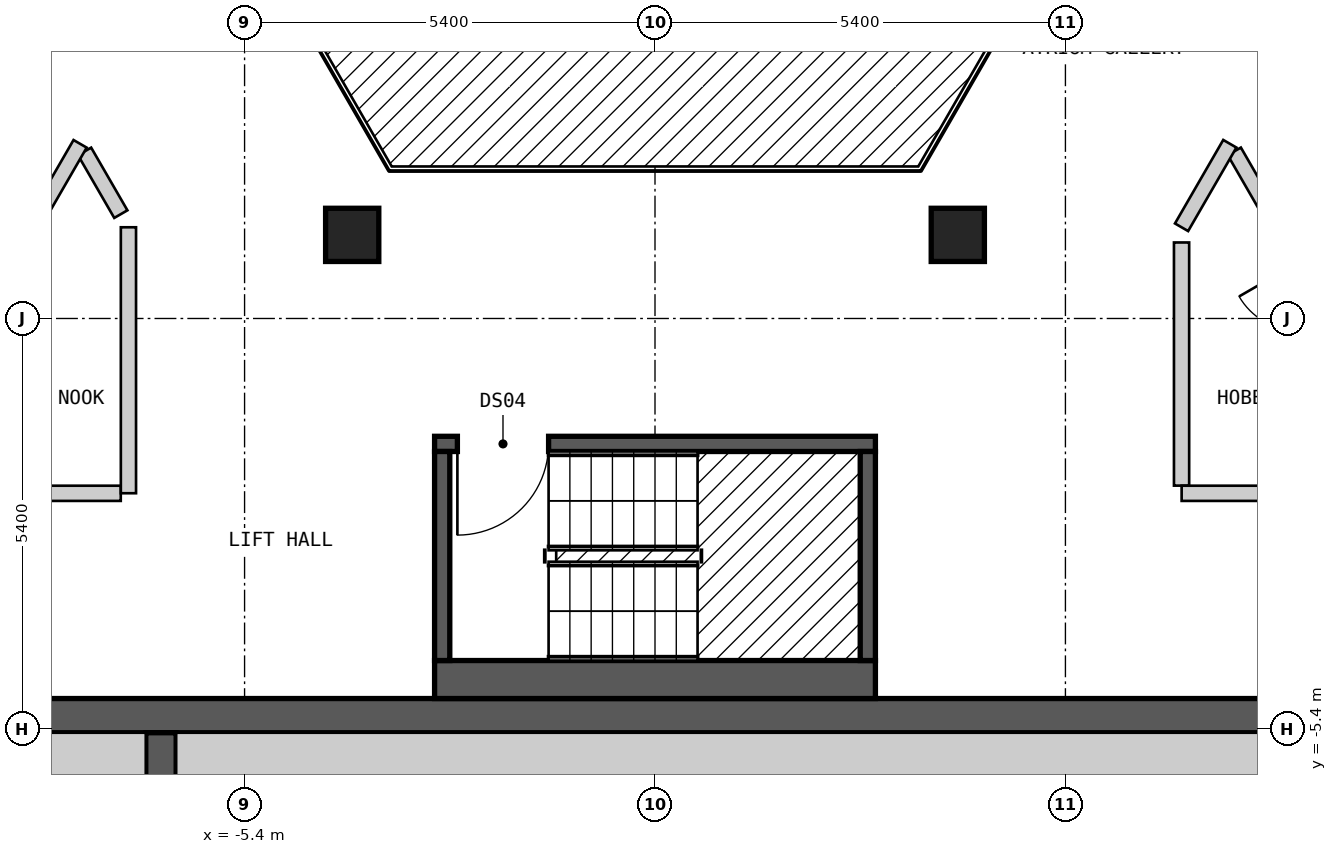
"""IFC4 building model, lengths in metres.
Left out: names, types, materials, properties, quantities, classifications, styles, units other than length and angle.
Written with IfcOpenShell. Run it as: python <this file> out.ifc"""

import sys

from ifc_helpers import new_model, si_unit, direction, frame, frame_2d, origin, origin_2d, place, context, subcontext, project, spatial, rectangle, extrude, element, fill, save


model = new_model("IFC4")
c1 = context("Model", 3, precision=1e-05, world=origin(), true_north=direction((0.0, 1.0)))
c2 = subcontext(c1, "Body", "Model", "MODEL_VIEW")
j1 = project(units=[si_unit("LENGTHUNIT", "METRE"), si_unit("PLANEANGLEUNIT", "RADIAN")], contexts=[c1])
p1 = place(None, origin())
s1 = spatial("IfcSite", under=j1, at=p1, CompositionType="ELEMENT")
p2 = place(p1, origin())
s2 = spatial("IfcBuilding", under=s1, at=p2, CompositionType="ELEMENT")
p3 = place(p2, frame((0.0, 0.0, 223.8)))
s3 = spatial("IfcBuildingStorey", under=s2, at=p3, CompositionType="ELEMENT", Elevation=223.8)
for number, where, z_axis, x_axis in (
    (1, (3.984, 1.1, 0.0), (0.0, 0.0, 1.0), (1.0, 0.0, 0.0)),
    (2, (-3.984, 1.1, 0.0), (0.0, 0.0, 1.0), (1.0, 0.0, 0.0)),
):
    element("IfcColumn", number, at=place(p3, frame(where, z_axis=z_axis, x_axis=x_axis)), inside=s3, PredefinedType="COLUMN", context=c2, shape_type="SweptSolid", body=[
        extrude(rectangle(XDim=0.7, YDim=0.7, at=origin_2d()), origin(), (0.0, 0.0, 1.0), 3.0),
    ])
p4 = place(p3, frame((-13.3, -5.225, 0.0), z_axis=(0.0, 0.0, 1.0), x_axis=(1.0, 0.0, 0.0)))
e3 = element("IfcWall", 3, at=p4, inside=s3, PredefinedType="SHEAR", context=c2, shape_type="SweptSolid", body=[
    extrude(rectangle(XDim=26.6, YDim=0.45, at=frame_2d((13.3, 0.0))), origin(), (0.0, 0.0, 1.0), 2.7),
])
p5 = place(p4, frame((23.65, 0.0, 0.0)))
e4 = element("IfcOpeningElement", 4, at=p5, cuts=e3, PredefinedType="OPENING", context=c2, shape_type="SweptSolid", body=[
    extrude(rectangle(XDim=1.2, YDim=2.1, at=frame_2d((0.6, 1.05))), frame((0.0, 0.235, 0.0), z_axis=(0.0, -1.0, 0.0), x_axis=(1.0, 0.0, 0.0)), (0.0, 0.0, 1.0), 0.47),
])
p6 = place(p3, frame((-6.5, -9.15, 0.0), z_axis=(0.0, 0.0, 1.0), x_axis=(0.0, 1.0, 0.0)))
e5 = element("IfcWall", 5, at=p6, inside=s3, PredefinedType="SHEAR", context=c2, shape_type="SweptSolid", body=[
    extrude(rectangle(XDim=3.7, YDim=0.4, at=frame_2d((1.85, 0.0))), origin(), (0.0, 0.0, 1.0), 2.7),
])
p7 = place(p3, frame((-2.9, -4.75, 0.0), z_axis=(0.0, 0.0, 1.0), x_axis=(1.0, 0.0, 0.0)))
e6 = element("IfcWall", 6, at=p7, inside=s3, PredefinedType="SOLIDWALL", context=c2, shape_type="SweptSolid", body=[
    extrude(rectangle(XDim=5.8, YDim=0.5, at=frame_2d((2.9, 0.0))), origin(), (0.0, 0.0, 1.0), 2.7),
])
p8 = place(p3, frame((-2.9, -1.65, 0.0), z_axis=(0.0, 0.0, 1.0), x_axis=(1.0, 0.0, 0.0)))
e7 = element("IfcWall", 7, at=p8, inside=s3, PredefinedType="SOLIDWALL", context=c2, shape_type="SweptSolid", body=[
    extrude(rectangle(XDim=5.8, YDim=0.2, at=frame_2d((2.9, 0.0))), origin(), (0.0, 0.0, 1.0), 2.7),
])
p9 = place(p8, frame((0.3, 0.0, 0.0)))
e8 = element("IfcOpeningElement", 8, at=p9, cuts=e7, PredefinedType="OPENING", context=c2, shape_type="SweptSolid", body=[
    extrude(rectangle(XDim=1.2, YDim=2.1, at=frame_2d((0.6, 1.05))), frame((0.0, 0.11, 0.0), z_axis=(0.0, -1.0, 0.0), x_axis=(1.0, 0.0, 0.0)), (0.0, 0.0, 1.0), 0.22),
])
for number, where, z_axis, x_axis in (
    (9, (-2.8, -4.5, 0.0), (0.0, 0.0, 1.0), (0.0, 1.0, 0.0)),
    (10, (2.8, -4.5, 0.0), (0.0, 0.0, 1.0), (0.0, 1.0, 0.0)),
):
    element("IfcWall", number, at=place(p3, frame(where, z_axis=z_axis, x_axis=x_axis)), inside=s3, PredefinedType="SOLIDWALL", context=c2, shape_type="SweptSolid", body=[
        extrude(rectangle(XDim=2.75, YDim=0.2, at=frame_2d((1.375, 0.0))), origin(), (0.0, 0.0, 1.0), 2.7),
    ])
p10 = place(p3, frame((-7.505, 2.198, 0.0), z_axis=(0.0, 0.0, 1.0), x_axis=(0.500409926597, -0.865788603161, 0.0)))
e11 = element("IfcWall", 11, at=p10, inside=s3, PredefinedType="PARTITIONING", context=c2, shape_type="SweptSolid", body=[
    extrude(rectangle(XDim=0.953, YDim=0.2, at=frame_2d((0.477, 0.0))), origin(), (0.0, 0.0, 1.0), 2.7),
])
p11 = place(p3, frame((7.622, 2.199, 0.0), z_axis=(0.0, 0.0, 1.0), x_axis=(0.499994660107, -0.866028486751, 0.0)))
e12 = element("IfcWall", 12, at=p11, inside=s3, PredefinedType="PARTITIONING", context=c2, shape_type="SweptSolid", body=[
    extrude(rectangle(XDim=4.27, YDim=0.2, at=frame_2d((2.135, 0.0))), origin(), (0.0, 0.0, 1.0), 2.7),
])
p12 = place(p11, frame((1.685, 0.0, 0.0)))
e13 = element("IfcOpeningElement", 13, at=p12, cuts=e12, PredefinedType="OPENING", context=c2, shape_type="SweptSolid", body=[
    extrude(rectangle(XDim=0.9, YDim=2.1, at=frame_2d((0.45, 1.05))), frame((0.0, 0.11, 0.0), z_axis=(0.0, -1.0, 0.0), x_axis=(1.0, 0.0, 0.0)), (0.0, 0.0, 1.0), 0.22),
])
p13 = place(p3, frame((6.928, 1.0, 0.0), z_axis=(0.0, 0.0, 1.0), x_axis=(0.0, -1.0, 0.0)))
e14 = element("IfcWall", 14, at=p13, inside=s3, PredefinedType="PARTITIONING", context=c2, shape_type="SweptSolid", body=[
    extrude(rectangle(XDim=3.199, YDim=0.2, at=frame_2d((1.6, 0.0))), origin(), (0.0, 0.0, 1.0), 2.7),
])
p14 = place(p3, frame((-9.41, -2.3, 0.0), z_axis=(0.0, 0.0, 1.0), x_axis=(1.0, 0.0, 0.0)))
e15 = element("IfcWall", 15, at=p14, inside=s3, PredefinedType="PARTITIONING", context=c2, shape_type="SweptSolid", body=[
    extrude(rectangle(XDim=2.381, YDim=0.2, at=frame_2d((1.19, 0.0))), origin(), (0.0, 0.0, 1.0), 2.7),
])
p15 = place(p3, frame((6.929, -2.3, 0.0), z_axis=(0.0, 0.0, 1.0), x_axis=(1.0, 0.0, 0.0)))
e16 = element("IfcWall", 16, at=p15, inside=s3, PredefinedType="PARTITIONING", context=c2, shape_type="SweptSolid", body=[
    extrude(rectangle(XDim=2.365, YDim=0.2, at=frame_2d((1.183, 0.0))), origin(), (0.0, 0.0, 1.0), 2.7),
])
p16 = place(p3, frame((6.928, 1.2, 0.0), z_axis=(0.0, 0.0, 1.0), x_axis=(0.500255167297, 0.865878032746, 0.0)))
e17 = element("IfcWall", 17, at=p16, inside=s3, PredefinedType="PARTITIONING", context=c2, shape_type="SweptSolid", body=[
    extrude(rectangle(XDim=1.269, YDim=0.2, at=frame_2d((0.635, 0.0))), origin(), (0.0, 0.0, 1.0), 2.7),
])
p17 = place(p3, frame((-9.815, -1.6, 0.0), z_axis=(0.0, 0.0, 1.0), x_axis=(0.500058909736, 0.865991389561, 0.0)))
e18 = element("IfcWall", 18, at=p17, inside=s3, PredefinedType="PARTITIONING", context=c2, shape_type="SweptSolid", body=[
    extrude(rectangle(XDim=4.501, YDim=0.2, at=frame_2d((2.251, 0.0))), origin(), (0.0, 0.0, 1.0), 2.7),
])
p18 = place(p17, frame((1.801, 0.0, 0.0)))
e19 = element("IfcOpeningElement", 19, at=p18, cuts=e18, PredefinedType="OPENING", context=c2, shape_type="SweptSolid", body=[
    extrude(rectangle(XDim=0.9, YDim=2.1, at=frame_2d((0.45, 1.05))), frame((0.0, 0.11, 0.0), z_axis=(0.0, -1.0, 0.0), x_axis=(1.0, 0.0, 0.0)), (0.0, 0.0, 1.0), 0.22),
])
p19 = place(p3, frame((-6.928, -2.299, 0.0), z_axis=(0.0, 0.0, 1.0), x_axis=(0.0, 1.0, 0.0)))
e20 = element("IfcWall", 20, at=p19, inside=s3, PredefinedType="PARTITIONING", context=c2, shape_type="SweptSolid", body=[
    extrude(rectangle(XDim=3.499, YDim=0.2, at=frame_2d((1.75, 0.0))), origin(), (0.0, 0.0, 1.0), 2.7),
])
p20 = place(p3, frame((-12.1, -5.825, 0.0), z_axis=(0.0, 0.0, 1.0), x_axis=(1.0, 0.0, 0.0)))
e21 = element("IfcWall", 21, at=p20, inside=s3, PredefinedType="SOLIDWALL", context=c2, shape_type="SweptSolid", body=[
    extrude(rectangle(XDim=5.4, YDim=0.75, at=frame_2d((2.7, 0.0))), origin(), (0.0, 0.0, 1.0), 2.7),
])
p21 = place(p3, frame((-6.3, -5.825, 0.0), z_axis=(0.0, 0.0, 1.0), x_axis=(1.0, 0.0, 0.0)))
e22 = element("IfcWall", 22, at=p21, inside=s3, PredefinedType="SOLIDWALL", context=c2, shape_type="SweptSolid", body=[
    extrude(rectangle(XDim=16.1, YDim=0.75, at=frame_2d((8.05, 0.0))), origin(), (0.0, 0.0, 1.0), 2.7),
])
p22 = place(p9, origin())
e23 = element("IfcDoor", 23, at=p22, inside=s3, OperationType="SINGLE_SWING_LEFT", PredefinedType="DOOR", context=c2, shape_type="SweptSolid", body=[
    extrude(rectangle(XDim=1.2, YDim=2.1, at=frame_2d((0.6, 1.05))), frame((0.0, 0.025, 0.0), z_axis=(0.0, -1.0, 0.0), x_axis=(1.0, 0.0, 0.0)), (0.0, 0.0, 1.0), 0.05),
])
fill(e8, e23)
save(model, sys.argv[1])
